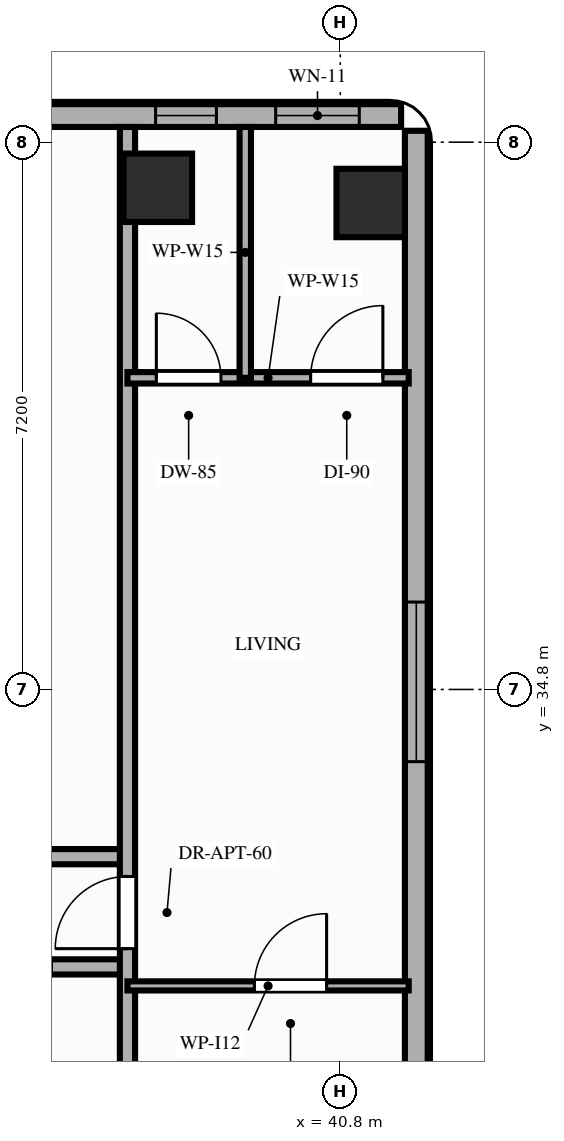
"""IFC4 building model, lengths in metres.
Left out: names, types, materials, properties, quantities, classifications, styles, units other than length and angle.
Written with IfcOpenShell. Run it as: python <this file> out.ifc"""

import sys

from ifc_helpers import new_model, si_unit, direction, frame, frame_2d, origin, origin_2d, place, context, subcontext, project, spatial, rectangle, extrude, element, fill, save


model = new_model("IFC4")
c1 = context("Model", 3, precision=1e-05, world=origin(), true_north=direction((0.0, 1.0)))
c2 = subcontext(c1, "Body", "Model", "MODEL_VIEW")
j1 = project(units=[si_unit("LENGTHUNIT", "METRE"), si_unit("PLANEANGLEUNIT", "RADIAN")], contexts=[c1])
p1 = place(None, origin())
s1 = spatial("IfcSite", under=j1, at=p1, CompositionType="ELEMENT")
p2 = place(p1, origin())
s2 = spatial("IfcBuilding", under=s1, at=p2, CompositionType="ELEMENT")
p3 = place(p2, frame((0.0, 0.0, 172.8)))
s3 = spatial("IfcBuildingStorey", under=s2, at=p3, CompositionType="ELEMENT", Elevation=172.8)
for number, where, z_axis, x_axis in (
    (1, (38.4, 41.4, 0.0), (0.0, 0.0, 1.0), (1.0, 0.0, 0.0)),
    (2, (41.2, 41.2, 0.0), (0.0, 0.0, 1.0), (1.0, 0.0, 0.0)),
):
    element("IfcColumn", number, at=place(p3, frame(where, z_axis=z_axis, x_axis=x_axis)), inside=s3, PredefinedType="COLUMN", context=c2, shape_type="SweptSolid", body=[
        extrude(rectangle(XDim=0.9, YDim=0.9, at=origin_2d()), origin(), (0.0, 0.0, 1.0), 3.2),
    ])
p4 = place(p3, frame((41.6, 42.35, 0.0), z_axis=(0.0, 0.0, 1.0), x_axis=(-1.0, 0.0, 0.0)))
e3 = element("IfcWall", 3, at=p4, inside=s3, PredefinedType="STANDARD", context=c2, shape_type="SweptSolid", body=[
    extrude(rectangle(XDim=14.25, YDim=0.3, at=frame_2d((7.125, 0.0))), origin(), (0.0, 0.0, 1.0), 2.45),
])
p5 = place(p4, frame((2.43, 0.0, 0.85)))
e4 = element("IfcOpeningElement", 4, at=p5, cuts=e3, PredefinedType="OPENING", context=c2, shape_type="SweptSolid", body=[
    extrude(rectangle(XDim=0.8, YDim=1.35, at=frame_2d((0.4, 0.675))), frame((0.0, 0.16, 0.0), z_axis=(0.0, -1.0, 0.0), x_axis=(1.0, 0.0, 0.0)), (0.0, 0.0, 1.0), 0.32),
])
p6 = place(p4, frame((0.55, 0.0, 0.85)))
e5 = element("IfcOpeningElement", 5, at=p6, cuts=e3, PredefinedType="OPENING", context=c2, shape_type="SweptSolid", body=[
    extrude(rectangle(XDim=1.1, YDim=1.35, at=frame_2d((0.55, 0.675))), frame((0.0, 0.16, 0.0), z_axis=(0.0, -1.0, 0.0), x_axis=(1.0, 0.0, 0.0)), (0.0, 0.0, 1.0), 0.32),
])
p7 = place(p3, frame((41.8, 26.8, 0.0), z_axis=(0.0, 0.0, 1.0), x_axis=(0.0, 1.0, 0.0)))
e6 = element("IfcWall", 6, at=p7, inside=s3, PredefinedType="STANDARD", context=c2, shape_type="SweptSolid", body=[
    extrude(rectangle(XDim=15.35, YDim=0.3, at=frame_2d((7.675, 0.0))), origin(), (0.0, 0.0, 1.0), 3.02),
])
p8 = place(p7, frame((7.05, 0.0, 0.85)))
e7 = element("IfcOpeningElement", 7, at=p8, cuts=e6, PredefinedType="OPENING", context=c2, shape_type="SweptSolid", body=[
    extrude(rectangle(XDim=2.1, YDim=1.8, at=frame_2d((1.05, 0.9))), frame((0.0, 0.16, 0.0), z_axis=(0.0, -1.0, 0.0), x_axis=(1.0, 0.0, 0.0)), (0.0, 0.0, 1.0), 0.32),
])
p9 = place(p3, frame((27.15, 31.15, 0.0), z_axis=(0.0, 0.0, 1.0), x_axis=(1.0, 0.0, 0.0)))
e8 = element("IfcWall", 8, at=p9, inside=s3, PredefinedType="PARTITIONING", context=c2, shape_type="SweptSolid", body=[
    extrude(rectangle(XDim=10.85, YDim=0.2, at=frame_2d((5.425, 0.0))), origin(), (0.0, 0.0, 1.0), 2.45),
])
p10 = place(p9, frame((1.25, 0.0, 0.0)))
e9 = element("IfcOpeningElement", 9, at=p10, cuts=e8, PredefinedType="OPENING", context=c2, shape_type="SweptSolid", body=[
    extrude(rectangle(XDim=0.95, YDim=2.15, at=frame_2d((0.475, 1.075))), frame((0.0, 0.11, 0.0), z_axis=(0.0, -1.0, 0.0), x_axis=(1.0, 0.0, 0.0)), (0.0, 0.0, 1.0), 0.22),
])
p11 = place(p9, frame((5.21, 0.0, 0.0)))
e10 = element("IfcOpeningElement", 10, at=p11, cuts=e8, PredefinedType="OPENING", context=c2, shape_type="SweptSolid", body=[
    extrude(rectangle(XDim=0.95, YDim=2.15, at=frame_2d((0.475, 1.075))), frame((0.0, 0.11, 0.0), z_axis=(0.0, -1.0, 0.0), x_axis=(1.0, 0.0, 0.0)), (0.0, 0.0, 1.0), 0.22),
])
p12 = place(p9, frame((8.9, 0.0, 0.0)))
e11 = element("IfcOpeningElement", 11, at=p12, cuts=e8, PredefinedType="OPENING", context=c2, shape_type="SweptSolid", body=[
    extrude(rectangle(XDim=0.95, YDim=2.15, at=frame_2d((0.475, 1.075))), frame((0.0, 0.11, 0.0), z_axis=(0.0, -1.0, 0.0), x_axis=(1.0, 0.0, 0.0)), (0.0, 0.0, 1.0), 0.22),
])
p13 = place(p3, frame((27.15, 32.6, 0.0), z_axis=(0.0, 0.0, 1.0), x_axis=(1.0, 0.0, 0.0)))
e12 = element("IfcWall", 12, at=p13, inside=s3, PredefinedType="PARTITIONING", context=c2, shape_type="SweptSolid", body=[
    extrude(rectangle(XDim=10.85, YDim=0.2, at=frame_2d((5.425, 0.0))), origin(), (0.0, 0.0, 1.0), 2.45),
])
p14 = place(p13, frame((1.22, 0.0, 0.0)))
e13 = element("IfcOpeningElement", 13, at=p14, cuts=e12, PredefinedType="OPENING", context=c2, shape_type="SweptSolid", body=[
    extrude(rectangle(XDim=0.95, YDim=2.15, at=frame_2d((0.475, 1.075))), frame((0.0, 0.11, 0.0), z_axis=(0.0, -1.0, 0.0), x_axis=(1.0, 0.0, 0.0)), (0.0, 0.0, 1.0), 0.22),
])
p15 = place(p13, frame((4.3, 0.0, 0.0)))
e14 = element("IfcOpeningElement", 14, at=p15, cuts=e12, PredefinedType="OPENING", context=c2, shape_type="SweptSolid", body=[
    extrude(rectangle(XDim=0.95, YDim=2.15, at=frame_2d((0.475, 1.075))), frame((0.0, 0.11, 0.0), z_axis=(0.0, -1.0, 0.0), x_axis=(1.0, 0.0, 0.0)), (0.0, 0.0, 1.0), 0.22),
])
p16 = place(p13, frame((8.26, 0.0, 0.0)))
e15 = element("IfcOpeningElement", 15, at=p16, cuts=e12, PredefinedType="OPENING", context=c2, shape_type="SweptSolid", body=[
    extrude(rectangle(XDim=0.95, YDim=2.15, at=frame_2d((0.475, 1.075))), frame((0.0, 0.11, 0.0), z_axis=(0.0, -1.0, 0.0), x_axis=(1.0, 0.0, 0.0)), (0.0, 0.0, 1.0), 0.22),
])
p17 = place(p3, frame((38.0, 26.75, 0.0), z_axis=(0.0, 0.0, 1.0), x_axis=(0.0, 1.0, 0.0)))
e16 = element("IfcWall", 16, at=p17, inside=s3, PredefinedType="PARTITIONING", context=c2, shape_type="SweptSolid", body=[
    extrude(rectangle(XDim=15.45, YDim=0.2, at=frame_2d((7.725, 0.0))), origin(), (0.0, 0.0, 1.0), 2.45),
])
p18 = place(p17, frame((4.64, 0.0, 0.0)))
e17 = element("IfcOpeningElement", 17, at=p18, cuts=e16, PredefinedType="OPENING", context=c2, shape_type="SweptSolid", body=[
    extrude(rectangle(XDim=0.95, YDim=2.15, at=frame_2d((0.475, 1.075))), frame((0.0, 0.11, 0.0), z_axis=(0.0, -1.0, 0.0), x_axis=(1.0, 0.0, 0.0)), (0.0, 0.0, 1.0), 0.22),
])
p19 = place(p3, frame((38.0, 30.9, 0.0), z_axis=(0.0, 0.0, 1.0), x_axis=(1.0, 0.0, 0.0)))
e18 = element("IfcWall", 18, at=p19, inside=s3, PredefinedType="PARTITIONING", context=c2, shape_type="SweptSolid", body=[
    extrude(rectangle(XDim=3.7, YDim=0.12, at=frame_2d((1.85, 0.0))), origin(), (0.0, 0.0, 1.0), 2.45),
])
p20 = place(p19, frame((1.67, 0.0, 0.0)))
e19 = element("IfcOpeningElement", 19, at=p20, cuts=e18, PredefinedType="OPENING", context=c2, shape_type="SweptSolid", body=[
    extrude(rectangle(XDim=0.95, YDim=2.15, at=frame_2d((0.475, 1.075))), frame((0.0, 0.07, 0.0), z_axis=(0.0, -1.0, 0.0), x_axis=(1.0, 0.0, 0.0)), (0.0, 0.0, 1.0), 0.14),
])
p21 = place(p3, frame((38.0, 38.9, 0.0), z_axis=(0.0, 0.0, 1.0), x_axis=(1.0, 0.0, 0.0)))
e20 = element("IfcWall", 20, at=p21, inside=s3, PredefinedType="PARTITIONING", context=c2, shape_type="SweptSolid", body=[
    extrude(rectangle(XDim=3.7, YDim=0.15, at=frame_2d((1.85, 0.0))), origin(), (0.0, 0.0, 1.0), 2.45),
])
p22 = place(p21, frame((0.38, 0.0, 0.0)))
e21 = element("IfcOpeningElement", 21, at=p22, cuts=e20, PredefinedType="OPENING", context=c2, shape_type="SweptSolid", body=[
    extrude(rectangle(XDim=0.85, YDim=2.1, at=frame_2d((0.425, 1.05))), frame((0.0, 0.085, 0.0), z_axis=(0.0, -1.0, 0.0), x_axis=(1.0, 0.0, 0.0)), (0.0, 0.0, 1.0), 0.17),
])
p23 = place(p21, frame((2.41, 0.0, 0.0)))
e22 = element("IfcOpeningElement", 22, at=p23, cuts=e20, PredefinedType="OPENING", context=c2, shape_type="SweptSolid", body=[
    extrude(rectangle(XDim=0.95, YDim=2.15, at=frame_2d((0.475, 1.075))), frame((0.0, 0.085, 0.0), z_axis=(0.0, -1.0, 0.0), x_axis=(1.0, 0.0, 0.0)), (0.0, 0.0, 1.0), 0.17),
])
p24 = place(p3, frame((39.55, 38.9, 0.0), z_axis=(0.0, 0.0, 1.0), x_axis=(0.0, 1.0, 0.0)))
e23 = element("IfcWall", 23, at=p24, inside=s3, PredefinedType="PARTITIONING", context=c2, shape_type="SweptSolid", body=[
    extrude(rectangle(XDim=3.3, YDim=0.15, at=frame_2d((1.65, 0.0))), origin(), (0.0, 0.0, 1.0), 2.45),
])
p25 = place(p8, origin())
e24 = element("IfcWindow", 24, at=p25, inside=s3, PartitioningType="SINGLE_PANEL", PredefinedType="WINDOW", context=c2, shape_type="SweptSolid", body=[
    extrude(rectangle(XDim=2.1, YDim=1.8, at=frame_2d((1.05, 0.9))), frame((0.0, 0.03, 0.0), z_axis=(0.0, -1.0, 0.0), x_axis=(1.0, 0.0, 0.0)), (0.0, 0.0, 1.0), 0.06),
])
fill(e7, e24)
p26 = place(p5, origin())
e25 = element("IfcWindow", 25, at=p26, inside=s3, PartitioningType="SINGLE_PANEL", PredefinedType="WINDOW", context=c2, shape_type="SweptSolid", body=[
    extrude(rectangle(XDim=0.8, YDim=1.35, at=frame_2d((0.4, 0.675))), frame((0.0, 0.03, 0.0), z_axis=(0.0, -1.0, 0.0), x_axis=(1.0, 0.0, 0.0)), (0.0, 0.0, 1.0), 0.06),
])
fill(e4, e25)
p27 = place(p6, origin())
e26 = element("IfcWindow", 26, at=p27, inside=s3, PartitioningType="SINGLE_PANEL", PredefinedType="WINDOW", context=c2, shape_type="SweptSolid", body=[
    extrude(rectangle(XDim=1.1, YDim=1.35, at=frame_2d((0.55, 0.675))), frame((0.0, 0.03, 0.0), z_axis=(0.0, -1.0, 0.0), x_axis=(1.0, 0.0, 0.0)), (0.0, 0.0, 1.0), 0.06),
])
fill(e5, e26)
p28 = place(p18, origin())
e27 = element("IfcDoor", 27, at=p28, inside=s3, OperationType="SINGLE_SWING_LEFT", PredefinedType="DOOR", context=c2, shape_type="SweptSolid", body=[
    extrude(rectangle(XDim=0.95, YDim=2.15, at=frame_2d((0.475, 1.075))), frame((0.0, 0.025, 0.0), z_axis=(0.0, -1.0, 0.0), x_axis=(1.0, 0.0, 0.0)), (0.0, 0.0, 1.0), 0.05),
])
fill(e17, e27)
p29 = place(p20, origin())
e28 = element("IfcDoor", 28, at=p29, inside=s3, OperationType="SINGLE_SWING_RIGHT", PredefinedType="DOOR", context=c2, shape_type="SweptSolid", body=[
    extrude(rectangle(XDim=0.95, YDim=2.15, at=frame_2d((0.475, 1.075))), frame((0.0, 0.025, 0.0), z_axis=(0.0, -1.0, 0.0), x_axis=(1.0, 0.0, 0.0)), (0.0, 0.0, 1.0), 0.05),
])
fill(e19, e28)
p30 = place(p22, origin())
e29 = element("IfcDoor", 29, at=p30, inside=s3, OperationType="SINGLE_SWING_LEFT", PredefinedType="DOOR", context=c2, shape_type="SweptSolid", body=[
    extrude(rectangle(XDim=0.85, YDim=2.1, at=frame_2d((0.425, 1.05))), frame((0.0, 0.025, 0.0), z_axis=(0.0, -1.0, 0.0), x_axis=(1.0, 0.0, 0.0)), (0.0, 0.0, 1.0), 0.05),
])
fill(e21, e29)
p31 = place(p23, origin())
e30 = element("IfcDoor", 30, at=p31, inside=s3, OperationType="SINGLE_SWING_RIGHT", PredefinedType="DOOR", context=c2, shape_type="SweptSolid", body=[
    extrude(rectangle(XDim=0.95, YDim=2.15, at=frame_2d((0.475, 1.075))), frame((0.0, 0.025, 0.0), z_axis=(0.0, -1.0, 0.0), x_axis=(1.0, 0.0, 0.0)), (0.0, 0.0, 1.0), 0.05),
])
fill(e22, e30)
save(model, sys.argv[1])
